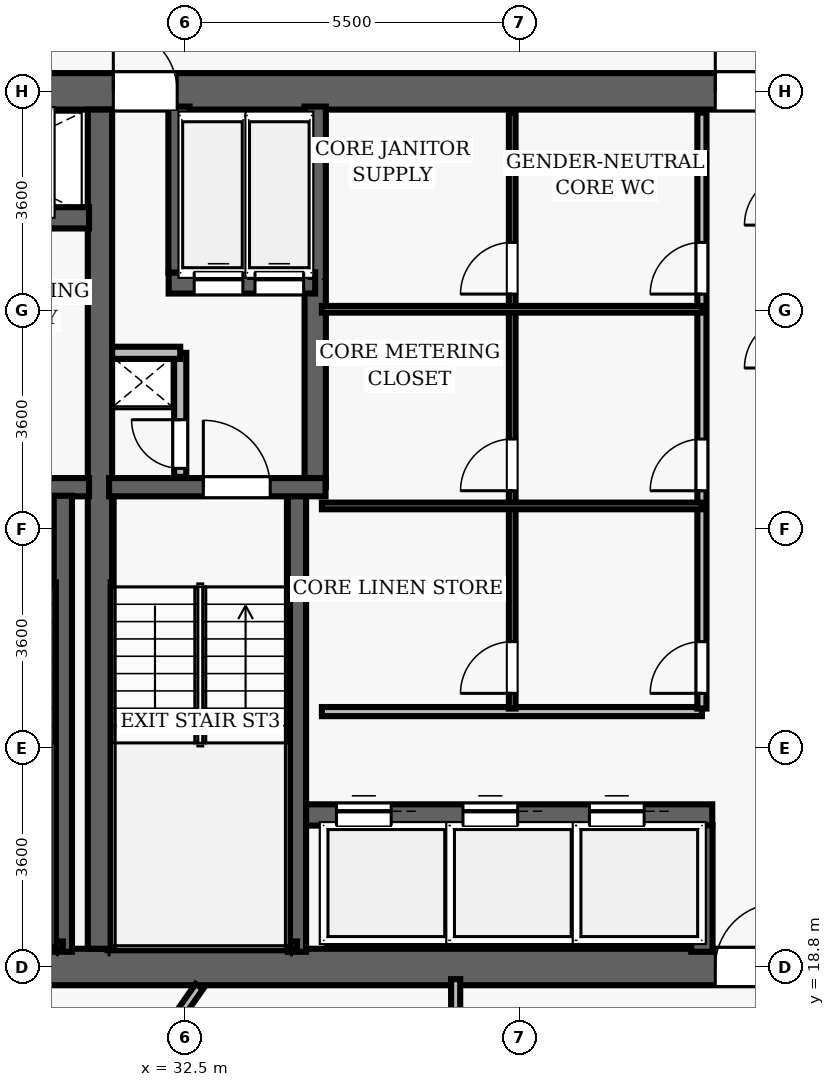
"""IFC4 building model, lengths in metres.
Left out: names, types, materials, properties, quantities, classifications, styles, units other than length and angle.
Written with IfcOpenShell. Run it as: python <this file> out.ifc"""

import sys

from ifc_helpers import new_model, si_unit, direction, frame, frame_2d, origin, place, context, subcontext, project, spatial, rectangle, extrude, element, fill, save


model = new_model("IFC4")
c1 = context("Model", 3, precision=1e-05, world=origin(), true_north=direction((0.0, 1.0)))
c2 = subcontext(c1, "Body", "Model", "MODEL_VIEW")
j1 = project(units=[si_unit("LENGTHUNIT", "METRE"), si_unit("PLANEANGLEUNIT", "RADIAN")], contexts=[c1])
p1 = place(None, origin())
s1 = spatial("IfcSite", under=j1, at=p1, CompositionType="ELEMENT")
p2 = place(p1, origin())
s2 = spatial("IfcBuilding", under=s1, at=p2, CompositionType="ELEMENT")
p3 = place(p2, frame((0.0, 0.0, 155.3)))
s3 = spatial("IfcBuildingStorey", under=s2, at=p3, CompositionType="ELEMENT", Elevation=155.3)
p4 = place(p3, frame((26.7, 18.8, 0.0), z_axis=(0.0, 0.0, 1.0), x_axis=(1.0, 0.0, 0.0)))
e1 = element("IfcWall", 1, at=p4, inside=s3, PredefinedType="SHEAR", context=c2, shape_type="SweptSolid", body=[
    extrude(rectangle(XDim=22.6, YDim=0.6, at=frame_2d((11.3, 0.0))), origin(), (0.0, 0.0, 1.0), 3.5),
])
p5 = place(p4, frame((14.52, 0.0, 0.0)))
e2 = element("IfcOpeningElement", 2, at=p5, cuts=e1, PredefinedType="OPENING", context=c2, shape_type="SweptSolid", body=[
    extrude(rectangle(XDim=1.05, YDim=2.15, at=frame_2d((0.525, 1.075))), frame((0.0, 0.31, 0.0), z_axis=(0.0, -1.0, 0.0), x_axis=(1.0, 0.0, 0.0)), (0.0, 0.0, 1.0), 0.62),
])
p6 = place(p3, frame((26.7, 33.2, 0.0), z_axis=(0.0, 0.0, 1.0), x_axis=(1.0, 0.0, 0.0)))
e3 = element("IfcWall", 3, at=p6, inside=s3, PredefinedType="SHEAR", context=c2, shape_type="SweptSolid", body=[
    extrude(rectangle(XDim=22.6, YDim=0.6, at=frame_2d((11.3, 0.0))), origin(), (0.0, 0.0, 1.0), 3.5),
])
p7 = place(p6, frame((4.62, 0.0, 0.0)))
e4 = element("IfcOpeningElement", 4, at=p7, cuts=e3, PredefinedType="OPENING", context=c2, shape_type="SweptSolid", body=[
    extrude(rectangle(XDim=1.05, YDim=2.15, at=frame_2d((0.525, 1.075))), frame((0.0, 0.31, 0.0), z_axis=(0.0, -1.0, 0.0), x_axis=(1.0, 0.0, 0.0)), (0.0, 0.0, 1.0), 0.62),
])
p8 = place(p6, frame((14.52, 0.0, 0.0)))
e5 = element("IfcOpeningElement", 5, at=p8, cuts=e3, PredefinedType="OPENING", context=c2, shape_type="SweptSolid", body=[
    extrude(rectangle(XDim=1.05, YDim=2.15, at=frame_2d((0.525, 1.075))), frame((0.0, 0.31, 0.0), z_axis=(0.0, -1.0, 0.0), x_axis=(1.0, 0.0, 0.0)), (0.0, 0.0, 1.0), 0.62),
])
p9 = place(p3, frame((31.1, 19.1, 0.0), z_axis=(0.0, 0.0, 1.0), x_axis=(0.0, 1.0, 0.0)))
e6 = element("IfcWall", 6, at=p9, inside=s3, PredefinedType="SHEAR", context=c2, shape_type="SweptSolid", body=[
    extrude(rectangle(XDim=13.8, YDim=0.4, at=frame_2d((6.9, 0.0))), origin(), (0.0, 0.0, 1.0), 3.5),
])
p10 = place(p3, frame((27.25, 26.69, 0.0), z_axis=(0.0, 0.0, 1.0), x_axis=(1.0, 0.0, 0.0)))
e7 = element("IfcWall", 7, at=p10, inside=s3, PredefinedType="SHEAR", context=c2, shape_type="SweptSolid", body=[
    extrude(rectangle(XDim=3.67, YDim=0.3, at=frame_2d((1.835, 0.0))), origin(), (0.0, 0.0, 1.0), 3.5),
])
p11 = place(p10, frame((1.05, 0.0, 0.0)))
e8 = element("IfcOpeningElement", 8, at=p11, cuts=e7, PredefinedType="OPENING", context=c2, shape_type="SweptSolid", body=[
    extrude(rectangle(XDim=1.1, YDim=2.15, at=frame_2d((0.55, 1.075))), frame((0.0, 0.16, 0.0), z_axis=(0.0, -1.0, 0.0), x_axis=(1.0, 0.0, 0.0)), (0.0, 0.0, 1.0), 0.32),
])
p12 = place(p3, frame((30.49, 19.05, 0.0), z_axis=(0.0, 0.0, 1.0), x_axis=(0.0, 1.0, 0.0)))
e9 = element("IfcWall", 9, at=p12, inside=s3, PredefinedType="SHEAR", context=c2, shape_type="SweptSolid", body=[
    extrude(rectangle(XDim=7.5, YDim=0.3, at=frame_2d((3.75, 0.0))), origin(), (0.0, 0.0, 1.0), 3.5),
])
p13 = place(p3, frame((27.395, 19.16, 0.0), z_axis=(0.0, 0.0, 1.0), x_axis=(1.0, 0.0, 0.0)))
e10 = element("IfcWall", 10, at=p13, inside=s3, PredefinedType="SHEAR", context=c2, shape_type="SweptSolid", body=[
    extrude(rectangle(XDim=3.095, YDim=0.12, at=frame_2d((1.547, 0.0))), origin(), (0.0, 0.0, 1.0), 3.5),
])
p14 = place(p3, frame((27.25, 31.12, 0.0), z_axis=(0.0, 0.0, 1.0), x_axis=(1.0, 0.0, 0.0)))
e11 = element("IfcWall", 11, at=p14, inside=s3, PredefinedType="SHEAR", context=c2, shape_type="SweptSolid", body=[
    extrude(rectangle(XDim=3.67, YDim=0.35, at=frame_2d((1.835, 0.0))), origin(), (0.0, 0.0, 1.0), 2.675),
])
p15 = place(p14, frame((1.25, 0.0, 0.0)))
e12 = element("IfcOpeningElement", 12, at=p15, cuts=e11, PredefinedType="OPENING", context=c2, shape_type="SweptSolid", body=[
    extrude(rectangle(XDim=1.1, YDim=2.15, at=frame_2d((0.55, 1.075))), frame((0.0, 0.185, 0.0), z_axis=(0.0, -1.0, 0.0), x_axis=(1.0, 0.0, 0.0)), (0.0, 0.0, 1.0), 0.37),
])
p16 = place(p3, frame((34.34, 19.05, 0.0), z_axis=(0.0, 0.0, 1.0), x_axis=(0.0, 1.0, 0.0)))
e13 = element("IfcWall", 13, at=p16, inside=s3, PredefinedType="SHEAR", context=c2, shape_type="SweptSolid", body=[
    extrude(rectangle(XDim=7.5, YDim=0.3, at=frame_2d((3.75, 0.0))), origin(), (0.0, 0.0, 1.0), 3.5),
])
p17 = place(p3, frame((34.64, 26.69, 0.0), z_axis=(0.0, 0.0, 1.0), x_axis=(0.0, 1.0, 0.0)))
e14 = element("IfcWall", 14, at=p17, inside=s3, PredefinedType="SHEAR", context=c2, shape_type="SweptSolid", body=[
    extrude(rectangle(XDim=6.26, YDim=0.35, at=frame_2d((3.13, 0.0))), origin(), (0.0, 0.0, 1.0), 3.5),
])
p18 = place(p3, frame((31.25, 26.69, 0.0), z_axis=(0.0, 0.0, 1.0), x_axis=(1.0, 0.0, 0.0)))
e15 = element("IfcWall", 15, at=p18, inside=s3, PredefinedType="SHEAR", context=c2, shape_type="SweptSolid", body=[
    extrude(rectangle(XDim=3.56, YDim=0.3, at=frame_2d((1.78, 0.0))), origin(), (0.0, 0.0, 1.0), 3.5),
])
p19 = place(p18, frame((1.55, 0.0, 0.0)))
e16 = element("IfcOpeningElement", 16, at=p19, cuts=e15, PredefinedType="OPENING", context=c2, shape_type="SweptSolid", body=[
    extrude(rectangle(XDim=1.1, YDim=2.15, at=frame_2d((0.55, 1.075))), frame((0.0, 0.16, 0.0), z_axis=(0.0, -1.0, 0.0), x_axis=(1.0, 0.0, 0.0)), (0.0, 0.0, 1.0), 0.32),
])
p20 = place(p3, frame((31.3, 19.16, 0.0), z_axis=(0.0, 0.0, 1.0), x_axis=(1.0, 0.0, 0.0)))
e17 = element("IfcWall", 17, at=p20, inside=s3, PredefinedType="SHEAR", context=c2, shape_type="SweptSolid", body=[
    extrude(rectangle(XDim=3.04, YDim=0.12, at=frame_2d((1.52, 0.0))), origin(), (0.0, 0.0, 1.0), 3.5),
])
p21 = place(p3, frame((32.23, 30.05, 0.0), z_axis=(0.0, 0.0, 1.0), x_axis=(1.0, 0.0, 0.0)))
e18 = element("IfcWall", 18, at=p21, inside=s3, PredefinedType="SHEAR", context=c2, shape_type="SweptSolid", body=[
    extrude(rectangle(XDim=2.41, YDim=0.35, at=frame_2d((1.205, 0.0))), origin(), (0.0, 0.0, 1.0), 2.675),
])
p22 = place(p21, frame((0.42, 0.0, 0.0)))
e19 = element("IfcOpeningElement", 19, at=p22, cuts=e18, PredefinedType="OPENING", context=c2, shape_type="SweptSolid", body=[
    extrude(rectangle(XDim=0.8, YDim=2.15, at=frame_2d((0.4, 1.075))), frame((0.0, 0.185, 0.0), z_axis=(0.0, -1.0, 0.0), x_axis=(1.0, 0.0, 0.0)), (0.0, 0.0, 1.0), 0.37),
])
p23 = place(p21, frame((1.42, 0.0, 0.0)))
e20 = element("IfcOpeningElement", 20, at=p23, cuts=e18, PredefinedType="OPENING", context=c2, shape_type="SweptSolid", body=[
    extrude(rectangle(XDim=0.8, YDim=2.15, at=frame_2d((0.4, 1.075))), frame((0.0, 0.185, 0.0), z_axis=(0.0, -1.0, 0.0), x_axis=(1.0, 0.0, 0.0)), (0.0, 0.0, 1.0), 0.37),
])
p24 = place(p3, frame((32.4, 30.22, 0.0), z_axis=(0.0, 0.0, 1.0), x_axis=(0.0, 1.0, 0.0)))
e21 = element("IfcWall", 21, at=p24, inside=s3, PredefinedType="SHEAR", context=c2, shape_type="SweptSolid", body=[
    extrude(rectangle(XDim=2.73, YDim=0.35, at=frame_2d((1.365, 0.0))), origin(), (0.0, 0.0, 1.0), 2.675),
])
p25 = place(p3, frame((32.42, 26.86, 0.0), z_axis=(0.0, 0.0, 1.0), x_axis=(0.0, 1.0, 0.0)))
e22 = element("IfcWall", 22, at=p25, inside=s3, PredefinedType="PARTITIONING", context=c2, shape_type="SweptSolid", body=[
    extrude(rectangle(XDim=2.04, YDim=0.2, at=frame_2d((1.02, 0.0))), origin(), (0.0, 0.0, 1.0), 2.675),
])
p26 = place(p25, frame((0.14, 0.0, 0.0)))
e23 = element("IfcOpeningElement", 23, at=p26, cuts=e22, PredefinedType="OPENING", context=c2, shape_type="SweptSolid", body=[
    extrude(rectangle(XDim=0.8, YDim=2.05, at=frame_2d((0.4, 1.025))), frame((0.0, 0.11, 0.0), z_axis=(0.0, -1.0, 0.0), x_axis=(1.0, 0.0, 0.0)), (0.0, 0.0, 1.0), 0.22),
])
p27 = place(p3, frame((31.3, 28.9, 0.0), z_axis=(0.0, 0.0, 1.0), x_axis=(1.0, 0.0, 0.0)))
e24 = element("IfcWall", 24, at=p27, inside=s3, PredefinedType="PARTITIONING", context=c2, shape_type="SweptSolid", body=[
    extrude(rectangle(XDim=1.12, YDim=0.2, at=frame_2d((0.56, 0.0))), origin(), (0.0, 0.0, 1.0), 2.675),
])
p28 = place(p3, frame((34.49, 21.3, 0.0), z_axis=(0.0, 0.0, 1.0), x_axis=(1.0, 0.0, 0.0)))
e25 = element("IfcWall", 25, at=p28, inside=s3, PredefinedType="SHEAR", context=c2, shape_type="SweptSolid", body=[
    extrude(rectangle(XDim=6.68, YDim=0.35, at=frame_2d((3.34, 0.0))), origin(), (0.0, 0.0, 1.0), 2.675),
])
p29 = place(p28, frame((0.5, 0.0, 0.0)))
e26 = element("IfcOpeningElement", 26, at=p29, cuts=e25, PredefinedType="OPENING", context=c2, shape_type="SweptSolid", body=[
    extrude(rectangle(XDim=0.9, YDim=2.15, at=frame_2d((0.45, 1.075))), frame((0.0, 0.185, 0.0), z_axis=(0.0, -1.0, 0.0), x_axis=(1.0, 0.0, 0.0)), (0.0, 0.0, 1.0), 0.37),
])
p30 = place(p28, frame((2.58, 0.0, 0.0)))
e27 = element("IfcOpeningElement", 27, at=p30, cuts=e25, PredefinedType="OPENING", context=c2, shape_type="SweptSolid", body=[
    extrude(rectangle(XDim=0.9, YDim=2.15, at=frame_2d((0.45, 1.075))), frame((0.0, 0.185, 0.0), z_axis=(0.0, -1.0, 0.0), x_axis=(1.0, 0.0, 0.0)), (0.0, 0.0, 1.0), 0.37),
])
p31 = place(p28, frame((4.66, 0.0, 0.0)))
e28 = element("IfcOpeningElement", 28, at=p31, cuts=e25, PredefinedType="OPENING", context=c2, shape_type="SweptSolid", body=[
    extrude(rectangle(XDim=0.9, YDim=2.15, at=frame_2d((0.45, 1.075))), frame((0.0, 0.185, 0.0), z_axis=(0.0, -1.0, 0.0), x_axis=(1.0, 0.0, 0.0)), (0.0, 0.0, 1.0), 0.37),
])
p32 = place(p3, frame((41.0, 19.05, 0.0), z_axis=(0.0, 0.0, 1.0), x_axis=(0.0, 1.0, 0.0)))
e29 = element("IfcWall", 29, at=p32, inside=s3, PredefinedType="SHEAR", context=c2, shape_type="SweptSolid", body=[
    extrude(rectangle(XDim=2.08, YDim=0.35, at=frame_2d((1.04, 0.0))), origin(), (0.0, 0.0, 1.0), 2.675),
])
p33 = place(p3, frame((34.75, 23.0, 0.0), z_axis=(0.0, 0.0, 1.0), x_axis=(1.0, 0.0, 0.0)))
e30 = element("IfcWall", 30, at=p33, inside=s3, PredefinedType="PARTITIONING", context=c2, shape_type="SweptSolid", body=[
    extrude(rectangle(XDim=6.25, YDim=0.15, at=frame_2d((3.125, 0.0))), origin(), (0.0, 0.0, 1.0), 2.675),
])
p34 = place(p3, frame((41.0, 23.05, 0.0), z_axis=(0.0, 0.0, 1.0), x_axis=(0.0, 1.0, 0.0)))
e31 = element("IfcWall", 31, at=p34, inside=s3, PredefinedType="PARTITIONING", context=c2, shape_type="SweptSolid", body=[
    extrude(rectangle(XDim=9.8, YDim=0.15, at=frame_2d((4.9, 0.0))), origin(), (0.0, 0.0, 1.0), 2.675),
])
p35 = place(p34, frame((0.25, 0.0, 0.0)))
e32 = element("IfcOpeningElement", 32, at=p35, cuts=e31, PredefinedType="OPENING", context=c2, shape_type="SweptSolid", body=[
    extrude(rectangle(XDim=0.85, YDim=2.1, at=frame_2d((0.425, 1.05))), frame((0.0, 0.085, 0.0), z_axis=(0.0, -1.0, 0.0), x_axis=(1.0, 0.0, 0.0)), (0.0, 0.0, 1.0), 0.17),
])
p36 = place(p34, frame((3.582, 0.0, 0.0)))
e33 = element("IfcOpeningElement", 33, at=p36, cuts=e31, PredefinedType="OPENING", context=c2, shape_type="SweptSolid", body=[
    extrude(rectangle(XDim=0.85, YDim=2.1, at=frame_2d((0.425, 1.05))), frame((0.0, 0.085, 0.0), z_axis=(0.0, -1.0, 0.0), x_axis=(1.0, 0.0, 0.0)), (0.0, 0.0, 1.0), 0.17),
])
p37 = place(p34, frame((6.816, 0.0, 0.0)))
e34 = element("IfcOpeningElement", 34, at=p37, cuts=e31, PredefinedType="OPENING", context=c2, shape_type="SweptSolid", body=[
    extrude(rectangle(XDim=0.85, YDim=2.1, at=frame_2d((0.425, 1.05))), frame((0.0, 0.085, 0.0), z_axis=(0.0, -1.0, 0.0), x_axis=(1.0, 0.0, 0.0)), (0.0, 0.0, 1.0), 0.17),
])
p38 = place(p3, frame((37.88, 23.05, 0.0), z_axis=(0.0, 0.0, 1.0), x_axis=(0.0, 1.0, 0.0)))
e35 = element("IfcWall", 35, at=p38, inside=s3, PredefinedType="PARTITIONING", context=c2, shape_type="SweptSolid", body=[
    extrude(rectangle(XDim=9.8, YDim=0.11, at=frame_2d((4.9, 0.0))), origin(), (0.0, 0.0, 1.0), 2.675),
])
p39 = place(p38, frame((0.25, 0.0, 0.0)))
e36 = element("IfcOpeningElement", 36, at=p39, cuts=e35, PredefinedType="OPENING", context=c2, shape_type="SweptSolid", body=[
    extrude(rectangle(XDim=0.85, YDim=2.1, at=frame_2d((0.425, 1.05))), frame((0.0, 0.065, 0.0), z_axis=(0.0, -1.0, 0.0), x_axis=(1.0, 0.0, 0.0)), (0.0, 0.0, 1.0), 0.13),
])
p40 = place(p38, frame((3.582, 0.0, 0.0)))
e37 = element("IfcOpeningElement", 37, at=p40, cuts=e35, PredefinedType="OPENING", context=c2, shape_type="SweptSolid", body=[
    extrude(rectangle(XDim=0.85, YDim=2.1, at=frame_2d((0.425, 1.05))), frame((0.0, 0.065, 0.0), z_axis=(0.0, -1.0, 0.0), x_axis=(1.0, 0.0, 0.0)), (0.0, 0.0, 1.0), 0.13),
])
p41 = place(p38, frame((6.816, 0.0, 0.0)))
e38 = element("IfcOpeningElement", 38, at=p41, cuts=e35, PredefinedType="OPENING", context=c2, shape_type="SweptSolid", body=[
    extrude(rectangle(XDim=0.85, YDim=2.1, at=frame_2d((0.425, 1.05))), frame((0.0, 0.065, 0.0), z_axis=(0.0, -1.0, 0.0), x_axis=(1.0, 0.0, 0.0)), (0.0, 0.0, 1.0), 0.13),
])
for number, where, z_axis, x_axis in (
    (39, (34.75, 26.382, 0.0), (0.0, 0.0, 1.0), (1.0, 0.0, 0.0)),
    (40, (34.75, 29.616, 0.0), (0.0, 0.0, 1.0), (1.0, 0.0, 0.0)),
):
    element("IfcWall", number, at=place(p3, frame(where, z_axis=z_axis, x_axis=x_axis)), inside=s3, PredefinedType="PARTITIONING", context=c2, shape_type="SweptSolid", body=[
        extrude(rectangle(XDim=6.25, YDim=0.11, at=frame_2d((3.125, 0.0))), origin(), (0.0, 0.0, 1.0), 2.675),
    ])
p42 = place(p3, frame((36.95, 11.2, 0.0), z_axis=(0.0, 0.0, 1.0), x_axis=(0.0, 1.0, 0.0)))
e41 = element("IfcWall", 41, at=p42, inside=s3, PredefinedType="PARTITIONING", context=c2, shape_type="SweptSolid", body=[
    extrude(rectangle(XDim=7.4, YDim=0.15, at=frame_2d((3.7, 0.0))), origin(), (0.0, 0.0, 1.0), 2.675),
])
p43 = place(p42, frame((5.075, 0.0, 0.0)))
e42 = element("IfcOpeningElement", 42, at=p43, cuts=e41, PredefinedType="OPENING", context=c2, shape_type="SweptSolid", body=[
    extrude(rectangle(XDim=0.95, YDim=2.15, at=frame_2d((0.475, 1.075))), frame((0.0, 0.085, 0.0), z_axis=(0.0, -1.0, 0.0), x_axis=(1.0, 0.0, 0.0)), (0.0, 0.0, 1.0), 0.17),
])
p44 = place(p3, frame((32.734, 18.48, 0.0), z_axis=(0.0, 0.0, 1.0), x_axis=(-0.573573265071, -0.819154264834, 0.0)))
e43 = element("IfcWall", 43, at=p44, inside=s3, PredefinedType="PARTITIONING", context=c2, shape_type="SweptSolid", body=[
    extrude(rectangle(XDim=13.885, YDim=0.15, at=frame_2d((6.942, 0.0))), origin(), (0.0, 0.0, 1.0), 2.675),
])
p45 = place(p19, origin())
e44 = element("IfcDoor", 44, at=p45, inside=s3, OperationType="SINGLE_SWING_LEFT", PredefinedType="DOOR", context=c2, shape_type="SweptSolid", body=[
    extrude(rectangle(XDim=1.1, YDim=2.15, at=frame_2d((0.55, 1.075))), frame((0.0, 0.025, 0.0), z_axis=(0.0, -1.0, 0.0), x_axis=(1.0, 0.0, 0.0)), (0.0, 0.0, 1.0), 0.05),
])
fill(e16, e44)
p46 = place(p26, origin())
e45 = element("IfcDoor", 45, at=p46, inside=s3, OperationType="SINGLE_SWING_RIGHT", PredefinedType="DOOR", context=c2, shape_type="SweptSolid", body=[
    extrude(rectangle(XDim=0.8, YDim=2.05, at=frame_2d((0.4, 1.025))), frame((0.0, 0.025, 0.0), z_axis=(0.0, -1.0, 0.0), x_axis=(1.0, 0.0, 0.0)), (0.0, 0.0, 1.0), 0.05),
])
fill(e23, e45)
p47 = place(p7, origin())
e46 = element("IfcDoor", 46, at=p47, inside=s3, OperationType="SINGLE_SWING_LEFT", PredefinedType="DOOR", context=c2, shape_type="SweptSolid", body=[
    extrude(rectangle(XDim=1.05, YDim=2.15, at=frame_2d((0.525, 1.075))), frame((0.0, 0.025, 0.0), z_axis=(0.0, -1.0, 0.0), x_axis=(1.0, 0.0, 0.0)), (0.0, 0.0, 1.0), 0.05),
])
fill(e4, e46)
p48 = place(p8, origin())
e47 = element("IfcDoor", 47, at=p48, inside=s3, OperationType="SINGLE_SWING_LEFT", PredefinedType="DOOR", context=c2, shape_type="SweptSolid", body=[
    extrude(rectangle(XDim=1.05, YDim=2.15, at=frame_2d((0.525, 1.075))), frame((0.0, 0.025, 0.0), z_axis=(0.0, -1.0, 0.0), x_axis=(1.0, 0.0, 0.0)), (0.0, 0.0, 1.0), 0.05),
])
fill(e5, e47)
p49 = place(p5, origin())
e48 = element("IfcDoor", 48, at=p49, inside=s3, OperationType="SINGLE_SWING_RIGHT", PredefinedType="DOOR", context=c2, shape_type="SweptSolid", body=[
    extrude(rectangle(XDim=1.05, YDim=2.15, at=frame_2d((0.525, 1.075))), frame((0.0, 0.025, 0.0), z_axis=(0.0, -1.0, 0.0), x_axis=(1.0, 0.0, 0.0)), (0.0, 0.0, 1.0), 0.05),
])
fill(e2, e48)
p50 = place(p35, origin())
e49 = element("IfcDoor", 49, at=p50, inside=s3, OperationType="SINGLE_SWING_LEFT", PredefinedType="DOOR", context=c2, shape_type="SweptSolid", body=[
    extrude(rectangle(XDim=0.85, YDim=2.1, at=frame_2d((0.425, 1.05))), frame((0.0, 0.025, 0.0), z_axis=(0.0, -1.0, 0.0), x_axis=(1.0, 0.0, 0.0)), (0.0, 0.0, 1.0), 0.05),
])
fill(e32, e49)
p51 = place(p39, origin())
e50 = element("IfcDoor", 50, at=p51, inside=s3, OperationType="SINGLE_SWING_LEFT", PredefinedType="DOOR", context=c2, shape_type="SweptSolid", body=[
    extrude(rectangle(XDim=0.85, YDim=2.1, at=frame_2d((0.425, 1.05))), frame((0.0, 0.025, 0.0), z_axis=(0.0, -1.0, 0.0), x_axis=(1.0, 0.0, 0.0)), (0.0, 0.0, 1.0), 0.05),
])
fill(e36, e50)
p52 = place(p36, origin())
e51 = element("IfcDoor", 51, at=p52, inside=s3, OperationType="SINGLE_SWING_LEFT", PredefinedType="DOOR", context=c2, shape_type="SweptSolid", body=[
    extrude(rectangle(XDim=0.85, YDim=2.1, at=frame_2d((0.425, 1.05))), frame((0.0, 0.025, 0.0), z_axis=(0.0, -1.0, 0.0), x_axis=(1.0, 0.0, 0.0)), (0.0, 0.0, 1.0), 0.05),
])
fill(e33, e51)
p53 = place(p40, origin())
e52 = element("IfcDoor", 52, at=p53, inside=s3, OperationType="SINGLE_SWING_LEFT", PredefinedType="DOOR", context=c2, shape_type="SweptSolid", body=[
    extrude(rectangle(XDim=0.85, YDim=2.1, at=frame_2d((0.425, 1.05))), frame((0.0, 0.025, 0.0), z_axis=(0.0, -1.0, 0.0), x_axis=(1.0, 0.0, 0.0)), (0.0, 0.0, 1.0), 0.05),
])
fill(e37, e52)
p54 = place(p37, origin())
e53 = element("IfcDoor", 53, at=p54, inside=s3, OperationType="SINGLE_SWING_LEFT", PredefinedType="DOOR", context=c2, shape_type="SweptSolid", body=[
    extrude(rectangle(XDim=0.85, YDim=2.1, at=frame_2d((0.425, 1.05))), frame((0.0, 0.025, 0.0), z_axis=(0.0, -1.0, 0.0), x_axis=(1.0, 0.0, 0.0)), (0.0, 0.0, 1.0), 0.05),
])
fill(e34, e53)
p55 = place(p41, origin())
e54 = element("IfcDoor", 54, at=p55, inside=s3, OperationType="SINGLE_SWING_LEFT", PredefinedType="DOOR", context=c2, shape_type="SweptSolid", body=[
    extrude(rectangle(XDim=0.85, YDim=2.1, at=frame_2d((0.425, 1.05))), frame((0.0, 0.025, 0.0), z_axis=(0.0, -1.0, 0.0), x_axis=(1.0, 0.0, 0.0)), (0.0, 0.0, 1.0), 0.05),
])
fill(e38, e54)
p56 = place(p29, origin())
e55 = element("IfcDoor", 55, at=p56, inside=s3, OperationType="SLIDING_TO_LEFT", PredefinedType="DOOR", context=c2, shape_type="SweptSolid", body=[
    extrude(rectangle(XDim=0.9, YDim=2.15, at=frame_2d((0.45, 1.075))), frame((0.0, 0.025, 0.0), z_axis=(0.0, -1.0, 0.0), x_axis=(1.0, 0.0, 0.0)), (0.0, 0.0, 1.0), 0.05),
])
fill(e26, e55)
p57 = place(p30, origin())
e56 = element("IfcDoor", 56, at=p57, inside=s3, OperationType="SLIDING_TO_LEFT", PredefinedType="DOOR", context=c2, shape_type="SweptSolid", body=[
    extrude(rectangle(XDim=0.9, YDim=2.15, at=frame_2d((0.45, 1.075))), frame((0.0, 0.025, 0.0), z_axis=(0.0, -1.0, 0.0), x_axis=(1.0, 0.0, 0.0)), (0.0, 0.0, 1.0), 0.05),
])
fill(e27, e56)
p58 = place(p31, origin())
e57 = element("IfcDoor", 57, at=p58, inside=s3, OperationType="SLIDING_TO_LEFT", PredefinedType="DOOR", context=c2, shape_type="SweptSolid", body=[
    extrude(rectangle(XDim=0.9, YDim=2.15, at=frame_2d((0.45, 1.075))), frame((0.0, 0.025, 0.0), z_axis=(0.0, -1.0, 0.0), x_axis=(1.0, 0.0, 0.0)), (0.0, 0.0, 1.0), 0.05),
])
fill(e28, e57)
p59 = place(p22, origin())
e58 = element("IfcDoor", 58, at=p59, inside=s3, OperationType="SLIDING_TO_LEFT", PredefinedType="DOOR", context=c2, shape_type="SweptSolid", body=[
    extrude(rectangle(XDim=0.8, YDim=2.15, at=frame_2d((0.4, 1.075))), frame((0.0, 0.025, 0.0), z_axis=(0.0, -1.0, 0.0), x_axis=(1.0, 0.0, 0.0)), (0.0, 0.0, 1.0), 0.05),
])
fill(e19, e58)
p60 = place(p23, origin())
e59 = element("IfcDoor", 59, at=p60, inside=s3, OperationType="SLIDING_TO_LEFT", PredefinedType="DOOR", context=c2, shape_type="SweptSolid", body=[
    extrude(rectangle(XDim=0.8, YDim=2.15, at=frame_2d((0.4, 1.075))), frame((0.0, 0.025, 0.0), z_axis=(0.0, -1.0, 0.0), x_axis=(1.0, 0.0, 0.0)), (0.0, 0.0, 1.0), 0.05),
])
fill(e20, e59)
save(model, sys.argv[1])
